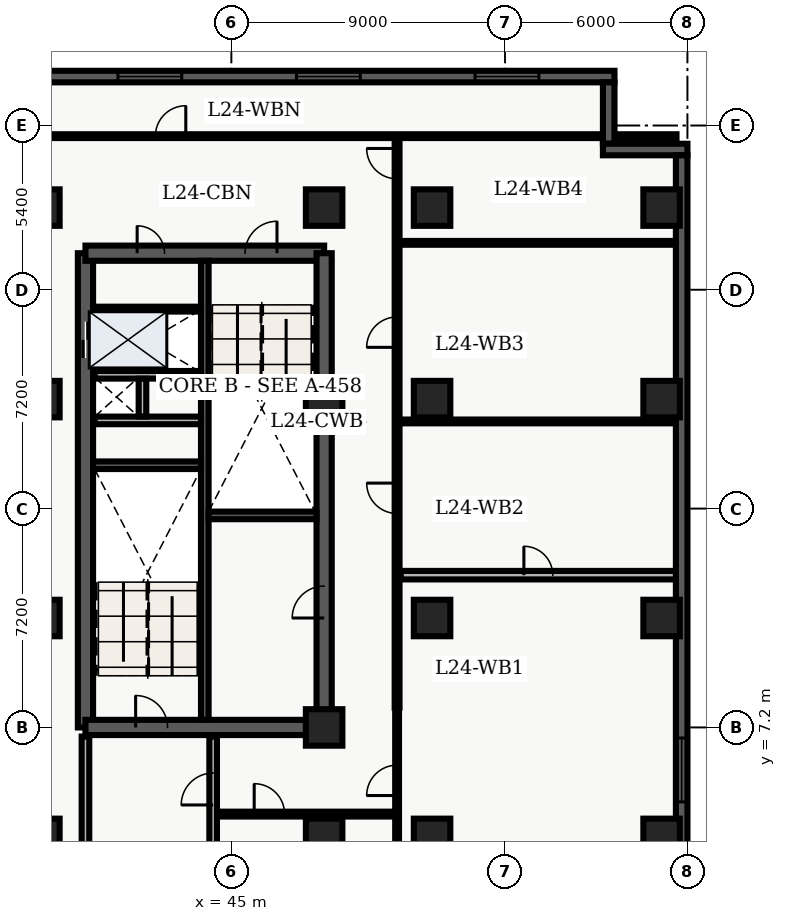
"""IFC4 building model, lengths in metres.
Left out: names, types, materials, properties, quantities, classifications, styles, units other than length and angle.
Written with IfcOpenShell. Run it as: python <this file> out.ifc"""

import sys

from ifc_helpers import new_model, entity, si_unit, converted_unit, direction, frame, origin_with_axes, origin_2d_with_axis, place, context, subcontext, project, spatial, polyline, rectangle, outline, extrude, element, fill, save


model = new_model("IFC4")
c1 = context("Model", 3, precision=1e-05, world=origin_with_axes(), true_north=direction((0.0, 1.0)))
c2 = subcontext(c1, "Body", "Model", "MODEL_VIEW")
j1 = project(units=[si_unit("LENGTHUNIT", "METRE"), converted_unit("PLANEANGLEUNIT", "DEGREE", entity("IfcPlaneAngleMeasure", 0.017), si_unit("PLANEANGLEUNIT", "RADIAN"), dimensions=[0, 0, 0, 0, 0, 0, 0])], contexts=[c1])
p1 = place(None, origin_with_axes())
s1 = spatial("IfcSite", under=j1, at=p1, CompositionType="ELEMENT")
p2 = place(p1, origin_with_axes())
s2 = spatial("IfcBuilding", under=s1, at=p2, CompositionType="ELEMENT")
p3 = place(p2, frame((0.0, 0.0, 100.8), z_axis=(0.0, 0.0, 1.0), x_axis=(1.0, 0.0, 0.0)))
s3 = spatial("IfcBuildingStorey", under=s2, at=p3, CompositionType="ELEMENT", Elevation=100.8)
p4 = place(p3, frame((40.2, 7.2, 0.0), z_axis=(0.0, 0.0, 1.0), x_axis=(0.0, 1.0, 0.0)))
e1 = element("IfcWall", 1, at=p4, inside=s3, PredefinedType="SHEAR", context=c2, shape_type="SweptSolid", body=[
    extrude(outline(polyline([(0.0, -0.25), (15.6, -0.25), (15.6, 0.25), (0.0, 0.25), (0.0, -0.25)])), origin_with_axes(), (0.0, 0.0, 1.0), 3.66),
])
p5 = place(p4, frame((12.75, 0.0, 0.0), z_axis=(0.0, 0.0, 1.0), x_axis=(1.0, 0.0, 0.0)))
e2 = element("IfcOpeningElement", 2, at=p5, cuts=e1, PredefinedType="OPENING", context=c2, shape_type="SweptSolid", body=[
    extrude(rectangle(XDim=1.2, YDim=0.52, at=origin_2d_with_axis()), origin_with_axes(), (0.0, 0.0, 1.0), 2.15),
])
p6 = place(p3, frame((40.2, 7.2, 0.0), z_axis=(0.0, 0.0, 1.0), x_axis=(1.0, 0.0, 0.0)))
e3 = element("IfcWall", 3, at=p6, inside=s3, PredefinedType="SHEAR", context=c2, shape_type="SweptSolid", body=[
    extrude(outline(polyline([(0.0, -0.25), (7.85, -0.25), (7.85, 0.25), (0.0, 0.25), (0.0, -0.25)])), origin_with_axes(), (0.0, 0.0, 1.0), 3.66),
])
p7 = place(p6, frame((2.175, 0.0, 0.0), z_axis=(0.0, 0.0, 1.0), x_axis=(1.0, 0.0, 0.0)))
e4 = element("IfcOpeningElement", 4, at=p7, cuts=e3, PredefinedType="OPENING", context=c2, shape_type="SweptSolid", body=[
    extrude(rectangle(XDim=1.05, YDim=0.52, at=origin_2d_with_axis()), origin_with_axes(), (0.0, 0.0, 1.0), 2.15),
])
p8 = place(p3, frame((40.2, 22.8, 0.0), z_axis=(0.0, 0.0, 1.0), x_axis=(1.0, 0.0, 0.0)))
e5 = element("IfcWall", 5, at=p8, inside=s3, PredefinedType="SHEAR", context=c2, shape_type="SweptSolid", body=[
    extrude(outline(polyline([(0.0, -0.25), (7.85, -0.25), (7.85, 0.25), (0.0, 0.25), (0.0, -0.25)])), origin_with_axes(), (0.0, 0.0, 1.0), 3.66),
])
p9 = place(p8, frame((5.775, 0.0, 0.0), z_axis=(0.0, 0.0, 1.0), x_axis=(1.0, 0.0, 0.0)))
e6 = element("IfcOpeningElement", 6, at=p9, cuts=e5, PredefinedType="OPENING", context=c2, shape_type="SweptSolid", body=[
    extrude(rectangle(XDim=1.05, YDim=0.52, at=origin_2d_with_axis()), origin_with_axes(), (0.0, 0.0, 1.0), 2.15),
])
p10 = place(p8, frame((2.15, 0.0, 0.0), z_axis=(0.0, 0.0, 1.0), x_axis=(1.0, 0.0, 0.0)))
e7 = element("IfcOpeningElement", 7, at=p10, cuts=e5, PredefinedType="OPENING", context=c2, shape_type="SweptSolid", body=[
    extrude(rectangle(XDim=0.9, YDim=0.52, at=origin_2d_with_axis()), origin_with_axes(), (0.0, 0.0, 1.0), 2.15),
])
p11 = place(p3, frame((48.05, 7.2, 0.0), z_axis=(0.0, 0.0, 1.0), x_axis=(0.0, 1.0, 0.0)))
e8 = element("IfcWall", 8, at=p11, inside=s3, PredefinedType="SHEAR", context=c2, shape_type="SweptSolid", body=[
    extrude(outline(polyline([(0.0, -0.25), (15.6, -0.25), (15.6, 0.25), (0.0, 0.25), (0.0, -0.25)])), origin_with_axes(), (0.0, 0.0, 1.0), 3.66),
])
p12 = place(p11, frame((4.125, 0.0, 0.0), z_axis=(0.0, 0.0, 1.0), x_axis=(1.0, 0.0, 0.0)))
e9 = element("IfcOpeningElement", 9, at=p12, cuts=e8, PredefinedType="OPENING", context=c2, shape_type="SweptSolid", body=[
    extrude(rectangle(XDim=1.05, YDim=0.52, at=origin_2d_with_axis()), origin_with_axes(), (0.0, 0.0, 1.0), 2.15),
])
p13 = place(p3, frame((44.125, 7.45, 0.0), z_axis=(0.0, 0.0, 1.0), x_axis=(0.0, 1.0, 0.0)))
e10 = element("IfcWall", 10, at=p13, inside=s3, PredefinedType="SHEAR", context=c2, shape_type="SweptSolid", body=[
    extrude(outline(polyline([(0.0, -0.125), (15.1, -0.125), (15.1, 0.125), (0.0, 0.125), (0.0, -0.125)])), origin_with_axes(), (0.0, 0.0, 1.0), 3.66),
])
for number, where, z_axis, x_axis in (
    (11, (40.45, 15.825, 0.0), (0.0, 0.0, 1.0), (1.0, 0.0, 0.0)),
    (12, (44.25, 14.175, 0.0), (0.0, 0.0, 1.0), (1.0, 0.0, 0.0)),
):
    element("IfcWall", number, at=place(p3, frame(where, z_axis=z_axis, x_axis=x_axis)), inside=s3, PredefinedType="SHEAR", context=c2, shape_type="SweptSolid", body=[
        extrude(outline(polyline([(0.0, -0.125), (3.55, -0.125), (3.55, 0.125), (0.0, 0.125), (0.0, -0.125)])), origin_with_axes(), (0.0, 0.0, 1.0), 3.66),
    ])
for number, where, z_axis, x_axis in (
    (13, (40.5, 17.3, 0.0), (0.0, 0.0, 1.0), (1.0, 0.0, 0.0)),
    (14, (40.5, 18.8, 0.0), (0.0, 0.0, 1.0), (1.0, 0.0, 0.0)),
):
    element("IfcWall", number, at=place(p3, frame(where, z_axis=z_axis, x_axis=x_axis)), inside=s3, PredefinedType="SOLIDWALL", context=c2, shape_type="SweptSolid", body=[
        extrude(outline(polyline([(0.0, -0.125), (3.5, -0.125), (3.5, 0.125), (0.0, 0.125), (0.0, -0.125)])), origin_with_axes(), (0.0, 0.0, 1.0), 2.7),
    ])
p14 = place(p3, frame((42.075, 17.43, 0.0), z_axis=(0.0, 0.0, 1.0), x_axis=(0.0, 1.0, 0.0)))
e15 = element("IfcWall", 15, at=p14, inside=s3, PredefinedType="SOLIDWALL", context=c2, shape_type="SweptSolid", body=[
    extrude(outline(polyline([(0.0, -0.125), (1.24, -0.125), (1.24, 0.125), (0.0, 0.125), (0.0, -0.125)])), origin_with_axes(), (0.0, 0.0, 1.0), 2.7),
])
p15 = place(p3, frame((40.2, 3.1, 0.0), z_axis=(0.0, 0.0, 1.0), x_axis=(0.0, 1.0, 0.0)))
e16 = element("IfcWall", 16, at=p15, inside=s3, PredefinedType="SOLIDWALL", context=c2, shape_type="SweptSolid", body=[
    extrude(outline(polyline([(0.0, -0.125), (3.8, -0.125), (3.8, 0.125), (0.0, 0.125), (0.0, -0.125)])), origin_with_axes(), (0.0, 0.0, 1.0), 2.7),
])
p16 = place(p3, frame((44.4, 3.1, 0.0), z_axis=(0.0, 0.0, 1.0), x_axis=(0.0, 1.0, 0.0)))
e17 = element("IfcWall", 17, at=p16, inside=s3, PredefinedType="SOLIDWALL", context=c2, shape_type="SweptSolid", body=[
    extrude(outline(polyline([(0.0, -0.125), (3.8, -0.125), (3.8, 0.125), (0.0, 0.125), (0.0, -0.125)])), origin_with_axes(), (0.0, 0.0, 1.0), 2.7),
])
p17 = place(p16, frame((2.075, 0.0, 0.0), z_axis=(0.0, 0.0, 1.0), x_axis=(1.0, 0.0, 0.0)))
e18 = element("IfcOpeningElement", 18, at=p17, cuts=e17, PredefinedType="OPENING", context=c2, shape_type="SweptSolid", body=[
    extrude(rectangle(XDim=1.05, YDim=0.27, at=origin_2d_with_axis()), origin_with_axes(), (0.0, 0.0, 1.0), 2.15),
])
for number, where, z_axis, x_axis in (
    (19, (38.75, 3.6, 0.0), (0.0, 0.0, 1.0), (1.0, 0.0, 0.0)),
    (20, (38.75, 10.8, 0.0), (0.0, 0.0, 1.0), (1.0, 0.0, 0.0)),
    (21, (38.75, 18.0, 0.0), (0.0, 0.0, 1.0), (1.0, 0.0, 0.0)),
    (22, (38.75, 24.3, 0.0), (0.0, 0.0, 1.0), (1.0, 0.0, 0.0)),
    (23, (48.05, 3.6, 0.0), (0.0, 0.0, 1.0), (1.0, 0.0, 0.0)),
    (24, (48.05, 7.2, 0.0), (0.0, 0.0, 1.0), (1.0, 0.0, 0.0)),
    (25, (48.05, 18.0, 0.0), (0.0, 0.0, 1.0), (1.0, 0.0, 0.0)),
    (26, (48.05, 24.3, 0.0), (0.0, 0.0, 1.0), (1.0, 0.0, 0.0)),
    (27, (51.6, 3.6, 0.0), (0.0, 0.0, 1.0), (1.0, 0.0, 0.0)),
    (28, (51.6, 10.8, 0.0), (0.0, 0.0, 1.0), (1.0, 0.0, 0.0)),
    (29, (51.6, 18.0, 0.0), (0.0, 0.0, 1.0), (1.0, 0.0, 0.0)),
    (30, (51.6, 24.3, 0.0), (0.0, 0.0, 1.0), (1.0, 0.0, 0.0)),
    (31, (59.15, 3.6, 0.0), (0.0, 0.0, 1.0), (1.0, 0.0, 0.0)),
    (32, (59.15, 10.8, 0.0), (0.0, 0.0, 1.0), (1.0, 0.0, 0.0)),
    (33, (59.15, 18.0, 0.0), (0.0, 0.0, 1.0), (1.0, 0.0, 0.0)),
    (34, (59.15, 24.3, 0.0), (0.0, 0.0, 1.0), (1.0, 0.0, 0.0)),
):
    element("IfcColumn", number, at=place(p3, frame(where, z_axis=z_axis, x_axis=x_axis)), inside=s3, PredefinedType="COLUMN", context=c2, shape_type="SweptSolid", body=[
        extrude(rectangle(XDim=1.2, YDim=1.2, at=origin_2d_with_axis()), origin_with_axes(), (0.0, 0.0, 1.0), 3.9),
    ])
p18 = place(p3, frame((40.5, 20.96, 0.0), z_axis=(0.0, 0.0, 1.0), x_axis=(1.0, 0.0, 0.0)))
e35 = element("IfcWall", 35, at=p18, inside=s3, PredefinedType="PARTITIONING", context=c2, shape_type="SweptSolid", body=[
    extrude(outline(polyline([(0.0, -0.08), (3.5, -0.08), (3.5, 0.08), (0.0, 0.08), (0.0, -0.08)])), origin_with_axes(), (0.0, 0.0, 1.0), 2.7),
])
p19 = place(p3, frame((50.45, 7.85, 0.0), z_axis=(0.0, 0.0, 1.0), x_axis=(0.0, 1.0, 0.0)))
e36 = element("IfcWall", 36, at=p19, inside=s3, PredefinedType="PARTITIONING", context=c2, shape_type="SweptSolid", body=[
    extrude(outline(polyline([(0.0, -0.08), (18.8, -0.08), (18.8, 0.08), (0.0, 0.08), (0.0, -0.08)])), origin_with_axes(), (0.0, 0.0, 1.0), 2.7),
])
p20 = place(p19, frame((6.888, 0.0, 0.0), z_axis=(0.0, 0.0, 1.0), x_axis=(1.0, 0.0, 0.0)))
e37 = element("IfcOpeningElement", 37, at=p20, cuts=e36, PredefinedType="OPENING", context=c2, shape_type="SweptSolid", body=[
    extrude(rectangle(XDim=1.0, YDim=0.18, at=origin_2d_with_axis()), origin_with_axes(), (0.0, 0.0, 1.0), 2.15),
])
p21 = place(p19, frame((12.353, 0.0, 0.0), z_axis=(0.0, 0.0, 1.0), x_axis=(1.0, 0.0, 0.0)))
e38 = element("IfcOpeningElement", 38, at=p21, cuts=e36, PredefinedType="OPENING", context=c2, shape_type="SweptSolid", body=[
    extrude(rectangle(XDim=1.0, YDim=0.18, at=origin_2d_with_axis()), origin_with_axes(), (0.0, 0.0, 1.0), 2.15),
])
p22 = place(p19, frame((17.895, 0.0, 0.0), z_axis=(0.0, 0.0, 1.0), x_axis=(1.0, 0.0, 0.0)))
e39 = element("IfcOpeningElement", 39, at=p22, cuts=e36, PredefinedType="OPENING", context=c2, shape_type="SweptSolid", body=[
    extrude(rectangle(XDim=1.0, YDim=0.18, at=origin_2d_with_axis()), origin_with_axes(), (0.0, 0.0, 1.0), 2.15),
])
p23 = place(p3, frame((38.76, 26.65, 0.0), z_axis=(0.0, 0.0, 1.0), x_axis=(1.0, 0.0, 0.0)))
e40 = element("IfcWall", 40, at=p23, inside=s3, PredefinedType="PARTITIONING", context=c2, shape_type="SweptSolid", body=[
    extrude(outline(polyline([(0.0, -0.062), (20.88, -0.062), (20.88, 0.062), (0.0, 0.062), (0.0, -0.062)])), origin_with_axes(), (0.0, 0.0, 1.0), 2.7),
])
p24 = place(p23, frame((4.24, 0.0, 0.0), z_axis=(0.0, 0.0, 1.0), x_axis=(1.0, 0.0, 0.0)))
e41 = element("IfcOpeningElement", 41, at=p24, cuts=e40, PredefinedType="OPENING", context=c2, shape_type="SweptSolid", body=[
    extrude(rectangle(XDim=1.0, YDim=0.145, at=origin_2d_with_axis()), origin_with_axes(), (0.0, 0.0, 1.0), 2.15),
])
p25 = place(p3, frame((44.55, 4.35, 0.0), z_axis=(0.0, 0.0, 1.0), x_axis=(1.0, 0.0, 0.0)))
e42 = element("IfcWall", 42, at=p25, inside=s3, PredefinedType="PARTITIONING", context=c2, shape_type="SweptSolid", body=[
    extrude(outline(polyline([(0.0, -0.08), (5.9, -0.08), (5.9, 0.08), (0.0, 0.08), (0.0, -0.08)])), origin_with_axes(), (0.0, 0.0, 1.0), 2.7),
])
p26 = place(p25, frame((1.7, 0.0, 0.0), z_axis=(0.0, 0.0, 1.0), x_axis=(1.0, 0.0, 0.0)))
e43 = element("IfcOpeningElement", 43, at=p26, cuts=e42, PredefinedType="OPENING", context=c2, shape_type="SweptSolid", body=[
    extrude(rectangle(XDim=1.0, YDim=0.18, at=origin_2d_with_axis()), origin_with_axes(), (0.0, 0.0, 1.0), 2.15),
])
p27 = place(p3, frame((50.45, 0.36, 0.0), z_axis=(0.0, 0.0, 1.0), x_axis=(0.0, 1.0, 0.0)))
e44 = element("IfcWall", 44, at=p27, inside=s3, PredefinedType="PARTITIONING", context=c2, shape_type="SweptSolid", body=[
    extrude(outline(polyline([(0.0, -0.062), (7.49, -0.062), (7.49, 0.062), (0.0, 0.062), (0.0, -0.062)])), origin_with_axes(), (0.0, 0.0, 1.0), 2.7),
])
p28 = place(p27, frame((5.1, 0.0, 0.0), z_axis=(0.0, 0.0, 1.0), x_axis=(1.0, 0.0, 0.0)))
e45 = element("IfcOpeningElement", 45, at=p28, cuts=e44, PredefinedType="OPENING", context=c2, shape_type="SweptSolid", body=[
    extrude(rectangle(XDim=1.0, YDim=0.145, at=origin_2d_with_axis()), origin_with_axes(), (0.0, 0.0, 1.0), 2.15),
])
p29 = place(p3, frame((50.57, 12.209, 0.0), z_axis=(0.0, 0.0, 1.0), x_axis=(1.0, 0.0, 0.0)))
e46 = element("IfcWall", 46, at=p29, inside=s3, PredefinedType="PARTITIONING", context=c2, shape_type="SweptSolid", body=[
    extrude(outline(polyline([(0.0, -0.14), (9.055, -0.14), (9.055, 0.14), (0.0, 0.14), (0.0, -0.14)])), origin_with_axes(), (0.0, 0.0, 1.0), 2.7),
])
p30 = place(p29, frame((4.525, 0.0, 0.0), z_axis=(0.0, 0.0, 1.0), x_axis=(1.0, 0.0, 0.0)))
e47 = element("IfcOpeningElement", 47, at=p30, cuts=e46, PredefinedType="OPENING", context=c2, shape_type="SweptSolid", body=[
    extrude(rectangle(XDim=0.95, YDim=0.3, at=origin_2d_with_axis()), origin_with_axes(), (0.0, 0.0, 1.0), 2.15),
])
for number, where, z_axis, x_axis in (
    (48, (50.57, 17.266, 0.0), (0.0, 0.0, 1.0), (1.0, 0.0, 0.0)),
    (49, (50.57, 23.14, 0.0), (0.0, 0.0, 1.0), (1.0, 0.0, 0.0)),
):
    element("IfcWall", number, at=place(p3, frame(where, z_axis=z_axis, x_axis=x_axis)), inside=s3, PredefinedType="PARTITIONING", context=c2, shape_type="SweptSolid", body=[
        extrude(outline(polyline([(0.0, -0.062), (9.055, -0.062), (9.055, 0.062), (0.0, 0.062), (0.0, -0.062)])), origin_with_axes(), (0.0, 0.0, 1.0), 2.7),
    ])
p31 = place(p3, frame((38.78, 28.61, 0.0), z_axis=(0.0, 0.0, 1.0), x_axis=(1.0, 0.0, 0.0)))
e50 = element("IfcWall", 50, at=p31, inside=s3, PredefinedType="SOLIDWALL", context=c2, shape_type="SweptSolid", body=[
    extrude(outline(polyline([(0.0, -0.19), (18.82, -0.19), (18.82, 0.19), (0.0, 0.19), (0.0, -0.19)])), origin_with_axes(), (0.0, 0.0, 1.0), 3.66),
])
p32 = place(p31, frame((3.537, 0.0, 0.45), z_axis=(0.0, 0.0, 1.0), x_axis=(1.0, 0.0, 0.0)))
e51 = element("IfcOpeningElement", 51, at=p32, cuts=e50, PredefinedType="OPENING", context=c2, shape_type="SweptSolid", body=[
    extrude(rectangle(XDim=2.1, YDim=0.4, at=origin_2d_with_axis()), origin_with_axes(), (0.0, 0.0, 1.0), 2.2),
])
p33 = place(p31, frame((9.41, 0.0, 0.45), z_axis=(0.0, 0.0, 1.0), x_axis=(1.0, 0.0, 0.0)))
e52 = element("IfcOpeningElement", 52, at=p33, cuts=e50, PredefinedType="OPENING", context=c2, shape_type="SweptSolid", body=[
    extrude(rectangle(XDim=2.1, YDim=0.4, at=origin_2d_with_axis()), origin_with_axes(), (0.0, 0.0, 1.0), 2.2),
])
p34 = place(p31, frame((15.283, 0.0, 0.45), z_axis=(0.0, 0.0, 1.0), x_axis=(1.0, 0.0, 0.0)))
e53 = element("IfcOpeningElement", 53, at=p34, cuts=e50, PredefinedType="OPENING", context=c2, shape_type="SweptSolid", body=[
    extrude(rectangle(XDim=2.1, YDim=0.4, at=origin_2d_with_axis()), origin_with_axes(), (0.0, 0.0, 1.0), 2.2),
])
p35 = place(p3, frame((57.41, 28.42, 0.0), z_axis=(0.0, 0.0, 1.0), x_axis=(0.0, -1.0, 0.0)))
e54 = element("IfcWall", 54, at=p35, inside=s3, PredefinedType="SOLIDWALL", context=c2, shape_type="SweptSolid", body=[
    extrude(outline(polyline([(0.0, -0.19), (2.02, -0.19), (2.02, 0.19), (0.0, 0.19), (0.0, -0.19)])), origin_with_axes(), (0.0, 0.0, 1.0), 3.66),
])
p36 = place(p3, frame((57.22, 26.21, 0.0), z_axis=(0.0, 0.0, 1.0), x_axis=(1.0, 0.0, 0.0)))
e55 = element("IfcWall", 55, at=p36, inside=s3, PredefinedType="SOLIDWALL", context=c2, shape_type="SweptSolid", body=[
    extrude(outline(polyline([(0.0, -0.19), (2.78, -0.19), (2.78, 0.19), (0.0, 0.19), (0.0, -0.19)])), origin_with_axes(), (0.0, 0.0, 1.0), 3.66),
])
p37 = place(p3, frame((59.81, 26.02, 0.0), z_axis=(0.0, 0.0, 1.0), x_axis=(0.0, -1.0, 0.0)))
e56 = element("IfcWall", 56, at=p37, inside=s3, PredefinedType="SOLIDWALL", context=c2, shape_type="SweptSolid", body=[
    extrude(outline(polyline([(0.0, -0.19), (23.62, -0.19), (23.62, 0.19), (0.0, 0.19), (0.0, -0.19)])), origin_with_axes(), (0.0, 0.0, 1.0), 3.66),
])
p38 = place(p37, frame((20.218, 0.0, 0.45), z_axis=(0.0, 0.0, 1.0), x_axis=(1.0, 0.0, 0.0)))
e57 = element("IfcOpeningElement", 57, at=p38, cuts=e56, PredefinedType="OPENING", context=c2, shape_type="SweptSolid", body=[
    extrude(rectangle(XDim=2.1, YDim=0.4, at=origin_2d_with_axis()), origin_with_axes(), (0.0, 0.0, 1.0), 2.2),
])
p39 = place(p4, frame((12.75, 0.0, 0.0), z_axis=(0.0, 0.0, 1.0), x_axis=(1.0, 0.0, 0.0)))
e58 = element("IfcDoor", 58, at=p39, inside=s3, OperationType="DOUBLE_DOOR_SLIDING", PredefinedType="DOOR", context=c2, shape_type="SweptSolid", body=[
    extrude(rectangle(XDim=1.2, YDim=0.09, at=origin_2d_with_axis()), origin_with_axes(), (0.0, 0.0, 1.0), 2.15),
])
fill(e2, e58)
p40 = place(p6, frame((2.175, 0.0, 0.0), z_axis=(0.0, 0.0, 1.0), x_axis=(1.0, 0.0, 0.0)))
e59 = element("IfcDoor", 59, at=p40, inside=s3, OperationType="SINGLE_SWING_LEFT", PredefinedType="DOOR", context=c2, shape_type="SweptSolid", body=[
    extrude(rectangle(XDim=1.05, YDim=0.09, at=origin_2d_with_axis()), origin_with_axes(), (0.0, 0.0, 1.0), 2.15),
])
fill(e4, e59)
p41 = place(p8, frame((5.775, 0.0, 0.0), z_axis=(0.0, 0.0, 1.0), x_axis=(1.0, 0.0, 0.0)))
e60 = element("IfcDoor", 60, at=p41, inside=s3, OperationType="SINGLE_SWING_RIGHT", PredefinedType="DOOR", context=c2, shape_type="SweptSolid", body=[
    extrude(rectangle(XDim=1.05, YDim=0.09, at=origin_2d_with_axis()), origin_with_axes(), (0.0, 0.0, 1.0), 2.15),
])
fill(e6, e60)
p42 = place(p16, frame((2.075, 0.0, 0.0), z_axis=(0.0, 0.0, 1.0), x_axis=(1.0, 0.0, 0.0)))
e61 = element("IfcDoor", 61, at=p42, inside=s3, OperationType="SINGLE_SWING_LEFT", PredefinedType="DOOR", context=c2, shape_type="SweptSolid", body=[
    extrude(rectangle(XDim=1.05, YDim=0.09, at=origin_2d_with_axis()), origin_with_axes(), (0.0, 0.0, 1.0), 2.15),
])
fill(e18, e61)
p43 = place(p8, frame((2.15, 0.0, 0.0), z_axis=(0.0, 0.0, 1.0), x_axis=(1.0, 0.0, 0.0)))
e62 = element("IfcDoor", 62, at=p43, inside=s3, OperationType="SINGLE_SWING_LEFT", PredefinedType="DOOR", context=c2, shape_type="SweptSolid", body=[
    extrude(rectangle(XDim=0.9, YDim=0.09, at=origin_2d_with_axis()), origin_with_axes(), (0.0, 0.0, 1.0), 2.15),
])
fill(e7, e62)
p44 = place(p11, frame((4.125, 0.0, 0.0), z_axis=(0.0, 0.0, 1.0), x_axis=(1.0, 0.0, 0.0)))
e63 = element("IfcDoor", 63, at=p44, inside=s3, OperationType="SINGLE_SWING_LEFT", PredefinedType="DOOR", context=c2, shape_type="SweptSolid", body=[
    extrude(rectangle(XDim=1.05, YDim=0.09, at=origin_2d_with_axis()), origin_with_axes(), (0.0, 0.0, 1.0), 2.15),
])
fill(e9, e63)
p45 = place(p25, frame((1.7, 0.0, 0.0), z_axis=(0.0, 0.0, 1.0), x_axis=(1.0, 0.0, 0.0)))
e64 = element("IfcDoor", 64, at=p45, inside=s3, OperationType="SINGLE_SWING_LEFT", PredefinedType="DOOR", context=c2, shape_type="SweptSolid", body=[
    extrude(rectangle(XDim=1.0, YDim=0.09, at=origin_2d_with_axis()), origin_with_axes(), (0.0, 0.0, 1.0), 2.15),
])
fill(e43, e64)
p46 = place(p27, frame((5.1, 0.0, 0.0), z_axis=(0.0, 0.0, 1.0), x_axis=(1.0, 0.0, 0.0)))
e65 = element("IfcDoor", 65, at=p46, inside=s3, OperationType="SINGLE_SWING_LEFT", PredefinedType="DOOR", context=c2, shape_type="SweptSolid", body=[
    extrude(rectangle(XDim=1.0, YDim=0.075, at=origin_2d_with_axis()), origin_with_axes(), (0.0, 0.0, 1.0), 2.15),
])
fill(e45, e65)
p47 = place(p23, frame((4.24, 0.0, 0.0), z_axis=(0.0, 0.0, 1.0), x_axis=(1.0, 0.0, 0.0)))
e66 = element("IfcDoor", 66, at=p47, inside=s3, OperationType="SINGLE_SWING_RIGHT", PredefinedType="DOOR", context=c2, shape_type="SweptSolid", body=[
    extrude(rectangle(XDim=1.0, YDim=0.075, at=origin_2d_with_axis()), origin_with_axes(), (0.0, 0.0, 1.0), 2.15),
])
fill(e41, e66)
p48 = place(p29, frame((4.525, 0.0, 0.0), z_axis=(0.0, 0.0, 1.0), x_axis=(1.0, 0.0, 0.0)))
e67 = element("IfcDoor", 67, at=p48, inside=s3, OperationType="SINGLE_SWING_LEFT", PredefinedType="DOOR", context=c2, shape_type="SweptSolid", body=[
    extrude(rectangle(XDim=0.95, YDim=0.09, at=origin_2d_with_axis()), origin_with_axes(), (0.0, 0.0, 1.0), 2.15),
])
fill(e47, e67)
p49 = place(p19, frame((6.888, 0.0, 0.0), z_axis=(0.0, 0.0, 1.0), x_axis=(1.0, 0.0, 0.0)))
e68 = element("IfcDoor", 68, at=p49, inside=s3, OperationType="SINGLE_SWING_RIGHT", PredefinedType="DOOR", context=c2, shape_type="SweptSolid", body=[
    extrude(rectangle(XDim=1.0, YDim=0.09, at=origin_2d_with_axis()), origin_with_axes(), (0.0, 0.0, 1.0), 2.15),
])
fill(e37, e68)
p50 = place(p19, frame((12.353, 0.0, 0.0), z_axis=(0.0, 0.0, 1.0), x_axis=(1.0, 0.0, 0.0)))
e69 = element("IfcDoor", 69, at=p50, inside=s3, OperationType="SINGLE_SWING_LEFT", PredefinedType="DOOR", context=c2, shape_type="SweptSolid", body=[
    extrude(rectangle(XDim=1.0, YDim=0.09, at=origin_2d_with_axis()), origin_with_axes(), (0.0, 0.0, 1.0), 2.15),
])
fill(e38, e69)
p51 = place(p19, frame((17.895, 0.0, 0.0), z_axis=(0.0, 0.0, 1.0), x_axis=(1.0, 0.0, 0.0)))
e70 = element("IfcDoor", 70, at=p51, inside=s3, OperationType="SINGLE_SWING_RIGHT", PredefinedType="DOOR", context=c2, shape_type="SweptSolid", body=[
    extrude(rectangle(XDim=1.0, YDim=0.09, at=origin_2d_with_axis()), origin_with_axes(), (0.0, 0.0, 1.0), 2.15),
])
fill(e39, e70)
p52 = place(p31, frame((3.537, 0.0, 0.45), z_axis=(0.0, 0.0, 1.0), x_axis=(1.0, 0.0, 0.0)))
e71 = element("IfcWindow", 71, at=p52, inside=s3, PredefinedType="WINDOW", context=c2, shape_type="SweptSolid", body=[
    extrude(rectangle(XDim=2.1, YDim=0.09, at=origin_2d_with_axis()), origin_with_axes(), (0.0, 0.0, 1.0), 2.2),
])
fill(e51, e71)
p53 = place(p31, frame((9.41, 0.0, 0.45), z_axis=(0.0, 0.0, 1.0), x_axis=(1.0, 0.0, 0.0)))
e72 = element("IfcWindow", 72, at=p53, inside=s3, PredefinedType="WINDOW", context=c2, shape_type="SweptSolid", body=[
    extrude(rectangle(XDim=2.1, YDim=0.09, at=origin_2d_with_axis()), origin_with_axes(), (0.0, 0.0, 1.0), 2.2),
])
fill(e52, e72)
p54 = place(p31, frame((15.283, 0.0, 0.45), z_axis=(0.0, 0.0, 1.0), x_axis=(1.0, 0.0, 0.0)))
e73 = element("IfcWindow", 73, at=p54, inside=s3, PredefinedType="WINDOW", context=c2, shape_type="SweptSolid", body=[
    extrude(rectangle(XDim=2.1, YDim=0.09, at=origin_2d_with_axis()), origin_with_axes(), (0.0, 0.0, 1.0), 2.2),
])
fill(e53, e73)
p55 = place(p37, frame((20.218, 0.0, 0.45), z_axis=(0.0, 0.0, 1.0), x_axis=(1.0, 0.0, 0.0)))
e74 = element("IfcWindow", 74, at=p55, inside=s3, PredefinedType="WINDOW", context=c2, shape_type="SweptSolid", body=[
    extrude(rectangle(XDim=2.1, YDim=0.09, at=origin_2d_with_axis()), origin_with_axes(), (0.0, 0.0, 1.0), 2.2),
])
fill(e57, e74)
save(model, sys.argv[1])
